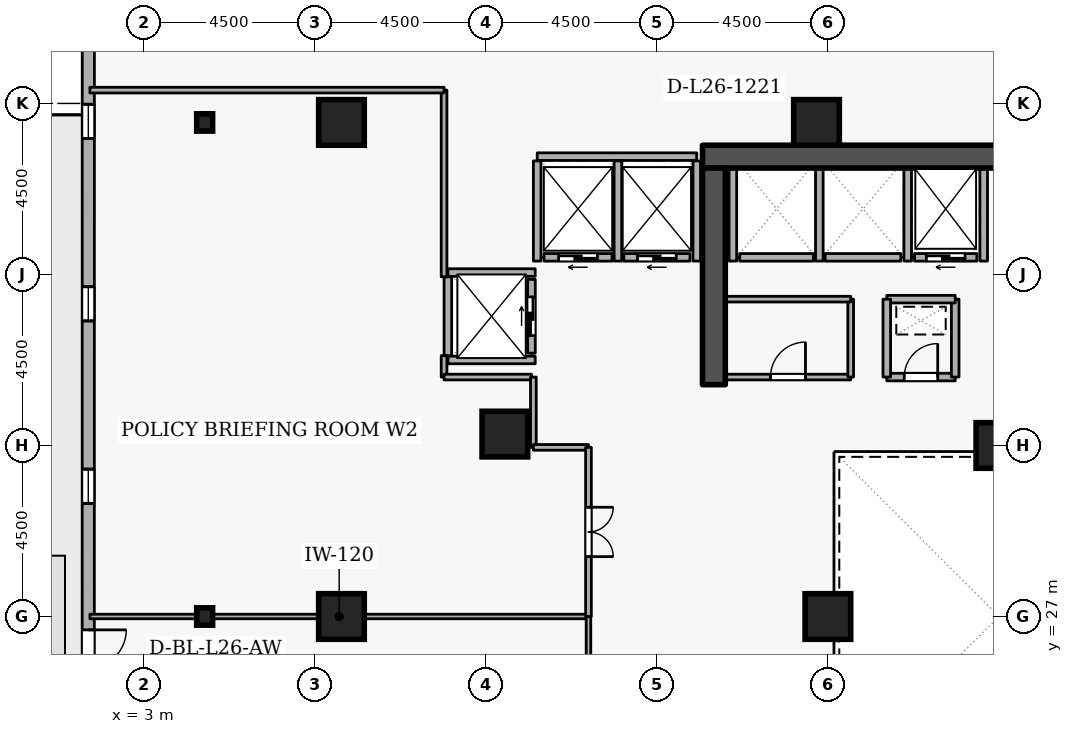
"""IFC4 building model, lengths in metres.
Left out: names, types, materials, properties, quantities, classifications, styles, units other than length and angle.
Written with IfcOpenShell. Run it as: python <this file> out.ifc"""

import sys

from ifc_helpers import new_model, si_unit, direction, frame, frame_2d, origin, origin_2d, place, context, subcontext, project, spatial, rectangle, i_section, extrude, element, fill, save


model = new_model("IFC4")
c1 = context("Model", 3, precision=1e-05, world=origin(), true_north=direction((0.0, 1.0)))
c2 = subcontext(c1, "Body", "Model", "MODEL_VIEW")
j1 = project(units=[si_unit("LENGTHUNIT", "METRE"), si_unit("PLANEANGLEUNIT", "RADIAN")], contexts=[c1])
p1 = place(None, origin())
s1 = spatial("IfcSite", under=j1, at=p1, CompositionType="ELEMENT")
p2 = place(p1, origin())
s2 = spatial("IfcBuilding", under=s1, at=p2, CompositionType="ELEMENT")
p3 = place(p2, frame((0.0, 0.0, 101.7)))
s3 = spatial("IfcBuildingStorey", under=s2, at=p3, CompositionType="ELEMENT", Elevation=101.7)
p4 = place(p3, frame((17.7, 39.1, 0.0), z_axis=(0.0, 0.0, 1.0), x_axis=(1.0, 0.0, 0.0)))
e1 = element("IfcWall", 1, at=p4, inside=s3, PredefinedType="SHEAR", context=c2, shape_type="SweptSolid", body=[
    extrude(rectangle(XDim=15.6, YDim=0.6, at=frame_2d((7.8, 0.0))), origin(), (0.0, 0.0, 1.0), 3.6),
])
p5 = place(p3, frame((18.0, 33.1, 0.0), z_axis=(0.0, 0.0, 1.0), x_axis=(0.0, 1.0, 0.0)))
e2 = element("IfcWall", 2, at=p5, inside=s3, PredefinedType="SHEAR", context=c2, shape_type="SweptSolid", body=[
    extrude(rectangle(XDim=5.7, YDim=0.6, at=frame_2d((2.85, 0.0))), origin(), (0.0, 0.0, 1.0), 3.6),
])
for number, where, z_axis, x_axis in (
    (3, (8.2, 27.0, 0.0), (0.0, 0.0, 1.0), (1.0, 0.0, 0.0)),
    (4, (8.2, 40.0, 0.0), (0.0, 0.0, 1.0), (1.0, 0.0, 0.0)),
    (5, (12.5, 31.8, 0.0), (0.0, 0.0, 1.0), (1.0, 0.0, 0.0)),
    (6, (20.7, 40.0, 0.0), (0.0, 0.0, 1.0), (1.0, 0.0, 0.0)),
    (7, (25.5, 31.5, 0.0), (0.0, 0.0, 1.0), (1.0, 0.0, 0.0)),
    (8, (21.0, 27.0, 0.0), (0.0, 0.0, 1.0), (1.0, 0.0, 0.0)),
):
    element("IfcColumn", number, at=place(p3, frame(where, z_axis=z_axis, x_axis=x_axis)), inside=s3, PredefinedType="COLUMN", context=c2, shape_type="SweptSolid", body=[
        extrude(rectangle(XDim=1.2, YDim=1.2, at=origin_2d()), origin(), (0.0, 0.0, 1.0), 3.6),
    ])
for number, where, z_axis, x_axis in (
    (9, (4.6, 27.0, 0.0), (0.0, 0.0, 1.0), (1.0, 0.0, 0.0)),
    (10, (4.6, 40.0, 0.0), (0.0, 0.0, 1.0), (1.0, 0.0, 0.0)),
):
    element("IfcColumn", number, at=place(p3, frame(where, z_axis=z_axis, x_axis=x_axis)), inside=s3, PredefinedType="COLUMN", context=c2, shape_type="SweptSolid", body=[
        extrude(i_section(OverallWidth=0.418, OverallDepth=0.456, WebThickness=0.042, FlangeThickness=0.067, FilletRadius=0.015, at=origin_2d()), origin(), (0.0, 0.0, 1.0), 3.6),
    ])
p6 = place(p3, frame((1.54, 47.077, 0.0), z_axis=(0.0, 0.0, 1.0), x_axis=(-0.00011704845, -0.99999999315, 0.0)))
e11 = element("IfcWall", 11, at=p6, inside=s3, PredefinedType="STANDARD", context=c2, shape_type="SweptSolid", body=[
    extrude(rectangle(XDim=35.459, YDim=0.32, at=frame_2d((17.729, 0.0))), origin(), (0.0, 0.0, 1.0), 2.7),
])
p7 = place(p6, frame((20.429, 0.0, 0.0)))
e12 = element("IfcOpeningElement", 12, at=p7, cuts=e11, PredefinedType="OPENING", context=c2, shape_type="SweptSolid", body=[
    extrude(rectangle(XDim=1.0, YDim=2.08, at=frame_2d((0.5, 1.04))), frame((0.0, 0.17, 0.0), z_axis=(0.0, -1.0, 0.0), x_axis=(1.0, 0.0, 0.0)), (0.0, 0.0, 1.0), 0.34),
])
p8 = place(p6, frame((1.8, 0.0, 0.72)))
e13 = element("IfcOpeningElement", 13, at=p8, cuts=e11, PredefinedType="OPENING", context=c2, shape_type="SweptSolid", body=[
    extrude(rectangle(XDim=0.9, YDim=1.75, at=frame_2d((0.45, 0.875))), frame((0.0, 0.17, 0.0), z_axis=(0.0, -1.0, 0.0), x_axis=(1.0, 0.0, 0.0)), (0.0, 0.0, 1.0), 0.34),
])
p9 = place(p6, frame((6.6, 0.0, 0.72)))
e14 = element("IfcOpeningElement", 14, at=p9, cuts=e11, PredefinedType="OPENING", context=c2, shape_type="SweptSolid", body=[
    extrude(rectangle(XDim=0.9, YDim=1.75, at=frame_2d((0.45, 0.875))), frame((0.0, 0.17, 0.0), z_axis=(0.0, -1.0, 0.0), x_axis=(1.0, 0.0, 0.0)), (0.0, 0.0, 1.0), 0.34),
])
p10 = place(p6, frame((11.4, 0.0, 0.72)))
e15 = element("IfcOpeningElement", 15, at=p10, cuts=e11, PredefinedType="OPENING", context=c2, shape_type="SweptSolid", body=[
    extrude(rectangle(XDim=0.9, YDim=1.75, at=frame_2d((0.45, 0.875))), frame((0.0, 0.17, 0.0), z_axis=(0.0, -1.0, 0.0), x_axis=(1.0, 0.0, 0.0)), (0.0, 0.0, 1.0), 0.34),
])
p11 = place(p6, frame((16.2, 0.0, 0.72)))
e16 = element("IfcOpeningElement", 16, at=p11, cuts=e11, PredefinedType="OPENING", context=c2, shape_type="SweptSolid", body=[
    extrude(rectangle(XDim=0.9, YDim=1.75, at=frame_2d((0.45, 0.875))), frame((0.0, 0.17, 0.0), z_axis=(0.0, -1.0, 0.0), x_axis=(1.0, 0.0, 0.0)), (0.0, 0.0, 1.0), 0.34),
])
p12 = place(p6, frame((25.8, 0.0, 0.72)))
e17 = element("IfcOpeningElement", 17, at=p12, cuts=e11, PredefinedType="OPENING", context=c2, shape_type="SweptSolid", body=[
    extrude(rectangle(XDim=0.9, YDim=1.75, at=frame_2d((0.45, 0.875))), frame((0.0, 0.17, 0.0), z_axis=(0.0, -1.0, 0.0), x_axis=(1.0, 0.0, 0.0)), (0.0, 0.0, 1.0), 0.34),
])
p13 = place(p6, frame((30.6, 0.0, 0.72)))
e18 = element("IfcOpeningElement", 18, at=p13, cuts=e11, PredefinedType="OPENING", context=c2, shape_type="SweptSolid", body=[
    extrude(rectangle(XDim=0.9, YDim=1.75, at=frame_2d((0.45, 0.875))), frame((0.0, 0.17, 0.0), z_axis=(0.0, -1.0, 0.0), x_axis=(1.0, 0.0, 0.0)), (0.0, 0.0, 1.0), 0.34),
])
p14 = place(p3, frame((24.92, 36.45, 0.0), z_axis=(0.0, 0.0, 1.0), x_axis=(-1.0, 0.0, 0.0)))
e19 = element("IfcWall", 19, at=p14, inside=s3, PredefinedType="STANDARD", context=c2, shape_type="SweptSolid", body=[
    extrude(rectangle(XDim=1.64, YDim=0.2, at=frame_2d((0.82, 0.0))), origin(), (0.0, 0.0, 1.0), 3.34),
])
p15 = place(p14, frame((0.31, 0.0, 0.0)))
e20 = element("IfcOpeningElement", 20, at=p15, cuts=e19, PredefinedType="OPENING", context=c2, shape_type="SweptSolid", body=[
    extrude(rectangle(XDim=1.02, YDim=2.06, at=frame_2d((0.51, 1.03))), frame((0.0, 0.11, 0.0), z_axis=(0.0, -1.0, 0.0), x_axis=(1.0, 0.0, 0.0)), (0.0, 0.0, 1.0), 0.22),
])
p16 = place(p3, frame((22.92, 36.45, 0.0), z_axis=(0.0, 0.0, 1.0), x_axis=(-1.0, 0.0, 0.0)))
e21 = element("IfcWall", 21, at=p16, inside=s3, PredefinedType="STANDARD", context=c2, shape_type="SweptSolid", body=[
    extrude(rectangle(XDim=1.99, YDim=0.2, at=frame_2d((0.995, 0.0))), origin(), (0.0, 0.0, 1.0), 3.34),
])
p17 = place(p3, frame((20.62, 36.45, 0.0), z_axis=(0.0, 0.0, 1.0), x_axis=(-1.0, 0.0, 0.0)))
e22 = element("IfcWall", 22, at=p17, inside=s3, PredefinedType="STANDARD", context=c2, shape_type="SweptSolid", body=[
    extrude(rectangle(XDim=1.94, YDim=0.2, at=frame_2d((0.97, 0.0))), origin(), (0.0, 0.0, 1.0), 3.34),
])
p18 = place(p3, frame((17.37, 36.45, 0.0), z_axis=(0.0, 0.0, 1.0), x_axis=(-1.0, 0.0, 0.0)))
e23 = element("IfcWall", 23, at=p18, inside=s3, PredefinedType="STANDARD", context=c2, shape_type="SweptSolid", body=[
    extrude(rectangle(XDim=1.74, YDim=0.2, at=frame_2d((0.87, 0.0))), origin(), (0.0, 0.0, 1.0), 3.34),
])
p19 = place(p18, frame((0.36, 0.0, 0.0)))
e24 = element("IfcOpeningElement", 24, at=p19, cuts=e23, PredefinedType="OPENING", context=c2, shape_type="SweptSolid", body=[
    extrude(rectangle(XDim=1.02, YDim=2.06, at=frame_2d((0.51, 1.03))), frame((0.0, 0.11, 0.0), z_axis=(0.0, -1.0, 0.0), x_axis=(1.0, 0.0, 0.0)), (0.0, 0.0, 1.0), 0.22),
])
p20 = place(p3, frame((15.32, 36.45, 0.0), z_axis=(0.0, 0.0, 1.0), x_axis=(-1.0, 0.0, 0.0)))
e25 = element("IfcWall", 25, at=p20, inside=s3, PredefinedType="STANDARD", context=c2, shape_type="SweptSolid", body=[
    extrude(rectangle(XDim=1.79, YDim=0.2, at=frame_2d((0.895, 0.0))), origin(), (0.0, 0.0, 1.0), 3.34),
])
p21 = place(p20, frame((0.385, 0.0, 0.0)))
e26 = element("IfcOpeningElement", 26, at=p21, cuts=e25, PredefinedType="OPENING", context=c2, shape_type="SweptSolid", body=[
    extrude(rectangle(XDim=1.02, YDim=2.06, at=frame_2d((0.51, 1.03))), frame((0.0, 0.11, 0.0), z_axis=(0.0, -1.0, 0.0), x_axis=(1.0, 0.0, 0.0)), (0.0, 0.0, 1.0), 0.22),
])
p22 = place(p3, frame((13.2, 33.93, 0.0), z_axis=(0.0, 0.0, 1.0), x_axis=(0.0, 1.0, 0.0)))
e27 = element("IfcWall", 27, at=p22, inside=s3, PredefinedType="STANDARD", context=c2, shape_type="SweptSolid", body=[
    extrude(rectangle(XDim=1.94, YDim=0.2, at=frame_2d((0.97, 0.0))), origin(), (0.0, 0.0, 1.0), 3.34),
])
p23 = place(p22, frame((0.46, 0.0, 0.0)))
e28 = element("IfcOpeningElement", 28, at=p23, cuts=e27, PredefinedType="OPENING", context=c2, shape_type="SweptSolid", body=[
    extrude(rectangle(XDim=1.02, YDim=2.06, at=frame_2d((0.51, 1.03))), frame((0.0, 0.11, 0.0), z_axis=(0.0, -1.0, 0.0), x_axis=(1.0, 0.0, 0.0)), (0.0, 0.0, 1.0), 0.22),
])
for number, where, z_axis, x_axis in (
    (29, (25.1, 36.352, 0.0), (0.0, 0.0, 1.0), (0.0, 1.0, 0.0)),
    (30, (23.1, 36.352, 0.0), (0.0, 0.0, 1.0), (0.0, 1.0, 0.0)),
    (31, (20.775, 36.352, 0.0), (0.0, 0.0, 1.0), (0.0, 1.0, 0.0)),
    (32, (18.5, 36.352, 0.0), (0.0, 0.0, 1.0), (0.0, 1.0, 0.0)),
):
    element("IfcWall", number, at=place(p3, frame(where, z_axis=z_axis, x_axis=x_axis)), inside=s3, PredefinedType="STANDARD", context=c2, shape_type="SweptSolid", body=[
        extrude(rectangle(XDim=2.436, YDim=0.2, at=frame_2d((1.218, 0.0))), origin(), (0.0, 0.0, 1.0), 3.34),
    ])
p24 = place(p3, frame((13.352, 39.1, 0.0), z_axis=(0.0, 0.0, 1.0), x_axis=(1.0, 0.0, 0.0)))
e33 = element("IfcWall", 33, at=p24, inside=s3, PredefinedType="STANDARD", context=c2, shape_type="SweptSolid", body=[
    extrude(rectangle(XDim=4.196, YDim=0.2, at=frame_2d((2.098, 0.0))), origin(), (0.0, 0.0, 1.0), 3.34),
])
p25 = place(p3, frame((17.55, 36.352, 0.0), z_axis=(0.0, 0.0, 1.0), x_axis=(0.0, 1.0, 0.0)))
e34 = element("IfcWall", 34, at=p25, inside=s3, PredefinedType="STANDARD", context=c2, shape_type="SweptSolid", body=[
    extrude(rectangle(XDim=2.636, YDim=0.2, at=frame_2d((1.318, 0.0))), origin(), (0.0, 0.0, 1.0), 2.545),
])
for number, where, z_axis, x_axis in (
    (35, (15.475, 36.352, 0.0), (0.0, 0.0, 1.0), (0.0, 1.0, 0.0)),
    (36, (13.35, 36.352, 0.0), (0.0, 0.0, 1.0), (0.0, 1.0, 0.0)),
):
    element("IfcWall", number, at=place(p3, frame(where, z_axis=z_axis, x_axis=x_axis)), inside=s3, PredefinedType="STANDARD", context=c2, shape_type="SweptSolid", body=[
        extrude(rectangle(XDim=2.636, YDim=0.2, at=frame_2d((1.318, 0.0))), origin(), (0.0, 0.0, 1.0), 3.34),
    ])
for number, where, z_axis, x_axis in (
    (37, (11.002, 36.05, 0.0), (0.0, 0.0, 1.0), (1.0, 0.0, 0.0)),
    (38, (11.002, 33.75, 0.0), (0.0, 0.0, 1.0), (1.0, 0.0, 0.0)),
):
    element("IfcWall", number, at=place(p3, frame(where, z_axis=z_axis, x_axis=x_axis)), inside=s3, PredefinedType="STANDARD", context=c2, shape_type="SweptSolid", body=[
        extrude(rectangle(XDim=2.296, YDim=0.2, at=frame_2d((1.148, 0.0))), origin(), (0.0, 0.0, 1.0), 3.34),
    ])
p26 = place(p3, frame((11.0, 33.862, 0.0), z_axis=(0.0, 0.0, 1.0), x_axis=(0.0, 1.0, 0.0)))
e39 = element("IfcWall", 39, at=p26, inside=s3, PredefinedType="STANDARD", context=c2, shape_type="SweptSolid", body=[
    extrude(rectangle(XDim=2.076, YDim=0.2, at=frame_2d((1.038, 0.0))), origin(), (0.0, 0.0, 1.0), 3.34),
])
p27 = place(p3, frame((22.55, 33.3, 0.0), z_axis=(0.0, 0.0, 1.0), x_axis=(1.0, 0.0, 0.0)))
e40 = element("IfcWall", 40, at=p27, inside=s3, PredefinedType="STANDARD", context=c2, shape_type="SweptSolid", body=[
    extrude(rectangle(XDim=1.8, YDim=0.2, at=frame_2d((0.9, 0.0))), origin(), (0.0, 0.0, 1.0), 3.34),
])
p28 = place(p27, frame((0.46, 0.0, 0.0)))
e41 = element("IfcOpeningElement", 41, at=p28, cuts=e40, PredefinedType="OPENING", context=c2, shape_type="SweptSolid", body=[
    extrude(rectangle(XDim=0.88, YDim=2.04, at=frame_2d((0.44, 1.02))), frame((0.0, 0.11, 0.0), z_axis=(0.0, -1.0, 0.0), x_axis=(1.0, 0.0, 0.0)), (0.0, 0.0, 1.0), 0.22),
])
p29 = place(p3, frame((24.35, 33.3, 0.0), z_axis=(0.0, 0.0, 1.0), x_axis=(0.0, 1.0, 0.0)))
e42 = element("IfcWall", 42, at=p29, inside=s3, PredefinedType="STANDARD", context=c2, shape_type="SweptSolid", body=[
    extrude(rectangle(XDim=2.05, YDim=0.2, at=frame_2d((1.025, 0.0))), origin(), (0.0, 0.0, 1.0), 3.34),
])
p30 = place(p3, frame((24.35, 35.35, 0.0), z_axis=(0.0, 0.0, 1.0), x_axis=(-1.0, 0.0, 0.0)))
e43 = element("IfcWall", 43, at=p30, inside=s3, PredefinedType="STANDARD", context=c2, shape_type="SweptSolid", body=[
    extrude(rectangle(XDim=1.8, YDim=0.2, at=frame_2d((0.9, 0.0))), origin(), (0.0, 0.0, 1.0), 3.34),
])
p31 = place(p3, frame((22.55, 35.35, 0.0), z_axis=(0.0, 0.0, 1.0), x_axis=(0.0, -1.0, 0.0)))
e44 = element("IfcWall", 44, at=p31, inside=s3, PredefinedType="STANDARD", context=c2, shape_type="SweptSolid", body=[
    extrude(rectangle(XDim=2.05, YDim=0.2, at=frame_2d((1.025, 0.0))), origin(), (0.0, 0.0, 1.0), 3.34),
])
p32 = place(p3, frame((18.3, 33.3, 0.0), z_axis=(0.0, 0.0, 1.0), x_axis=(1.0, 0.0, 0.0)))
e45 = element("IfcWall", 45, at=p32, inside=s3, PredefinedType="PARTITIONING", context=c2, shape_type="SweptSolid", body=[
    extrude(rectangle(XDim=3.3, YDim=0.15, at=frame_2d((1.65, 0.0))), origin(), (0.0, 0.0, 1.0), 3.34),
])
p33 = place(p32, frame((1.19, 0.0, 0.0)))
e46 = element("IfcOpeningElement", 46, at=p33, cuts=e45, PredefinedType="OPENING", context=c2, shape_type="SweptSolid", body=[
    extrude(rectangle(XDim=0.92, YDim=2.08, at=frame_2d((0.46, 1.04))), frame((0.0, 0.085, 0.0), z_axis=(0.0, -1.0, 0.0), x_axis=(1.0, 0.0, 0.0)), (0.0, 0.0, 1.0), 0.17),
])
p34 = place(p3, frame((21.6, 33.3, 0.0), z_axis=(0.0, 0.0, 1.0), x_axis=(0.0, 1.0, 0.0)))
e47 = element("IfcWall", 47, at=p34, inside=s3, PredefinedType="PARTITIONING", context=c2, shape_type="SweptSolid", body=[
    extrude(rectangle(XDim=2.05, YDim=0.15, at=frame_2d((1.025, 0.0))), origin(), (0.0, 0.0, 1.0), 3.34),
])
p35 = place(p3, frame((21.6, 35.35, 0.0), z_axis=(0.0, 0.0, 1.0), x_axis=(-1.0, 0.0, 0.0)))
e48 = element("IfcWall", 48, at=p35, inside=s3, PredefinedType="PARTITIONING", context=c2, shape_type="SweptSolid", body=[
    extrude(rectangle(XDim=3.3, YDim=0.15, at=frame_2d((1.65, 0.0))), origin(), (0.0, 0.0, 1.0), 3.34),
])
p36 = place(p3, frame((1.58, 27.0, 0.0), z_axis=(0.0, 0.0, 1.0), x_axis=(1.0, 0.0, 0.0)))
e49 = element("IfcWall", 49, at=p36, inside=s3, PredefinedType="PARTITIONING", context=c2, shape_type="SweptSolid", body=[
    extrude(rectangle(XDim=13.12, YDim=0.12, at=frame_2d((6.56, 0.0))), origin(), (0.0, 0.0, 1.0), 2.878),
])
p37 = place(p3, frame((14.7, 27.0, 0.0), z_axis=(0.0, 0.0, 1.0), x_axis=(0.0, -1.0, 0.0)))
e50 = element("IfcWall", 50, at=p37, inside=s3, PredefinedType="PARTITIONING", context=c2, shape_type="SweptSolid", body=[
    extrude(rectangle(XDim=4.45, YDim=0.12, at=frame_2d((2.225, 0.0))), origin(), (0.0, 0.0, 1.0), 3.34),
])
p38 = place(p37, frame((1.7, 0.0, 0.0)))
e51 = element("IfcOpeningElement", 51, at=p38, cuts=e50, PredefinedType="OPENING", context=c2, shape_type="SweptSolid", body=[
    extrude(rectangle(XDim=1.05, YDim=2.1, at=frame_2d((0.525, 1.05))), frame((0.0, 0.07, 0.0), z_axis=(0.0, -1.0, 0.0), x_axis=(1.0, 0.0, 0.0)), (0.0, 0.0, 1.0), 0.14),
])
p39 = place(p3, frame((10.9, 40.85, 0.0), z_axis=(0.0, 0.0, 1.0), x_axis=(0.0, -1.0, 0.0)))
e52 = element("IfcWall", 52, at=p39, inside=s3, PredefinedType="PARTITIONING", context=c2, shape_type="SweptSolid", body=[
    extrude(rectangle(XDim=4.912, YDim=0.15, at=frame_2d((2.456, 0.0))), origin(), (0.0, 0.0, 1.0), 3.34),
])
p40 = place(p3, frame((10.9, 33.862, 0.0), z_axis=(0.0, 0.0, 1.0), x_axis=(0.0, -1.0, 0.0)))
e53 = element("IfcWall", 53, at=p40, inside=s3, PredefinedType="PARTITIONING", context=c2, shape_type="SweptSolid", body=[
    extrude(rectangle(XDim=0.562, YDim=0.15, at=frame_2d((0.281, 0.0))), origin(), (0.0, 0.0, 1.0), 3.34),
])
p41 = place(p3, frame((10.9, 33.3, 0.0), z_axis=(0.0, 0.0, 1.0), x_axis=(1.0, 0.0, 0.0)))
e54 = element("IfcWall", 54, at=p41, inside=s3, PredefinedType="PARTITIONING", context=c2, shape_type="SweptSolid", body=[
    extrude(rectangle(XDim=2.3, YDim=0.15, at=frame_2d((1.15, 0.0))), origin(), (0.0, 0.0, 1.0), 3.34),
])
p42 = place(p3, frame((13.25, 33.3, 0.0), z_axis=(0.0, 0.0, 1.0), x_axis=(0.0, -1.0, 0.0)))
e55 = element("IfcWall", 55, at=p42, inside=s3, PredefinedType="PARTITIONING", context=c2, shape_type="SweptSolid", body=[
    extrude(rectangle(XDim=1.85, YDim=0.15, at=frame_2d((0.925, 0.0))), origin(), (0.0, 0.0, 1.0), 3.34),
])
p43 = place(p3, frame((13.25, 31.45, 0.0), z_axis=(0.0, 0.0, 1.0), x_axis=(1.0, 0.0, 0.0)))
e56 = element("IfcWall", 56, at=p43, inside=s3, PredefinedType="PARTITIONING", context=c2, shape_type="SweptSolid", body=[
    extrude(rectangle(XDim=1.45, YDim=0.15, at=frame_2d((0.725, 0.0))), origin(), (0.0, 0.0, 1.0), 3.34),
])
p44 = place(p3, frame((14.7, 31.45, 0.0), z_axis=(0.0, 0.0, 1.0), x_axis=(0.0, -1.0, 0.0)))
e57 = element("IfcWall", 57, at=p44, inside=s3, PredefinedType="PARTITIONING", context=c2, shape_type="SweptSolid", body=[
    extrude(rectangle(XDim=4.45, YDim=0.15, at=frame_2d((2.225, 0.0))), origin(), (0.0, 0.0, 1.0), 3.34),
])
p45 = place(p44, frame((1.575, 0.0, 0.0)))
e58 = element("IfcOpeningElement", 58, at=p45, cuts=e57, PredefinedType="OPENING", context=c2, shape_type="SweptSolid", body=[
    extrude(rectangle(XDim=1.3, YDim=2.12, at=frame_2d((0.65, 1.06))), frame((0.0, 0.085, 0.0), z_axis=(0.0, -1.0, 0.0), x_axis=(1.0, 0.0, 0.0)), (0.0, 0.0, 1.0), 0.17),
])
p46 = place(p3, frame((1.58, 40.85, 0.0), z_axis=(0.0, 0.0, 1.0), x_axis=(1.0, 0.0, 0.0)))
e59 = element("IfcWall", 59, at=p46, inside=s3, PredefinedType="PARTITIONING", context=c2, shape_type="SweptSolid", body=[
    extrude(rectangle(XDim=9.32, YDim=0.15, at=frame_2d((4.66, 0.0))), origin(), (0.0, 0.0, 1.0), 3.34),
])
p47 = place(p7, origin())
e60 = element("IfcDoor", 60, at=p47, inside=s3, OperationType="SINGLE_SWING_LEFT", PredefinedType="DOOR", context=c2, shape_type="SweptSolid", body=[
    extrude(rectangle(XDim=1.0, YDim=2.08, at=frame_2d((0.5, 1.04))), frame((0.0, 0.025, 0.0), z_axis=(0.0, -1.0, 0.0), x_axis=(1.0, 0.0, 0.0)), (0.0, 0.0, 1.0), 0.05),
])
fill(e12, e60)
p48 = place(p9, origin())
e61 = element("IfcWindow", 61, at=p48, inside=s3, PartitioningType="SINGLE_PANEL", PredefinedType="WINDOW", context=c2, shape_type="SweptSolid", body=[
    extrude(rectangle(XDim=0.9, YDim=1.75, at=frame_2d((0.45, 0.875))), frame((0.0, 0.03, 0.0), z_axis=(0.0, -1.0, 0.0), x_axis=(1.0, 0.0, 0.0)), (0.0, 0.0, 1.0), 0.06),
])
fill(e14, e61)
p49 = place(p10, origin())
e62 = element("IfcWindow", 62, at=p49, inside=s3, PartitioningType="SINGLE_PANEL", PredefinedType="WINDOW", context=c2, shape_type="SweptSolid", body=[
    extrude(rectangle(XDim=0.9, YDim=1.75, at=frame_2d((0.45, 0.875))), frame((0.0, 0.03, 0.0), z_axis=(0.0, -1.0, 0.0), x_axis=(1.0, 0.0, 0.0)), (0.0, 0.0, 1.0), 0.06),
])
fill(e15, e62)
p50 = place(p11, origin())
e63 = element("IfcWindow", 63, at=p50, inside=s3, PartitioningType="SINGLE_PANEL", PredefinedType="WINDOW", context=c2, shape_type="SweptSolid", body=[
    extrude(rectangle(XDim=0.9, YDim=1.75, at=frame_2d((0.45, 0.875))), frame((0.0, 0.03, 0.0), z_axis=(0.0, -1.0, 0.0), x_axis=(1.0, 0.0, 0.0)), (0.0, 0.0, 1.0), 0.06),
])
fill(e16, e63)
p51 = place(p15, origin())
e64 = element("IfcDoor", 64, at=p51, inside=s3, OperationType="SLIDING_TO_LEFT", PredefinedType="DOOR", context=c2, shape_type="SweptSolid", body=[
    extrude(rectangle(XDim=1.02, YDim=2.06, at=frame_2d((0.51, 1.03))), frame((0.0, 0.025, 0.0), z_axis=(0.0, -1.0, 0.0), x_axis=(1.0, 0.0, 0.0)), (0.0, 0.0, 1.0), 0.05),
])
fill(e20, e64)
p52 = place(p19, origin())
e65 = element("IfcDoor", 65, at=p52, inside=s3, OperationType="SLIDING_TO_LEFT", PredefinedType="DOOR", context=c2, shape_type="SweptSolid", body=[
    extrude(rectangle(XDim=1.02, YDim=2.06, at=frame_2d((0.51, 1.03))), frame((0.0, 0.025, 0.0), z_axis=(0.0, -1.0, 0.0), x_axis=(1.0, 0.0, 0.0)), (0.0, 0.0, 1.0), 0.05),
])
fill(e24, e65)
p53 = place(p21, origin())
e66 = element("IfcDoor", 66, at=p53, inside=s3, OperationType="SLIDING_TO_LEFT", PredefinedType="DOOR", context=c2, shape_type="SweptSolid", body=[
    extrude(rectangle(XDim=1.02, YDim=2.06, at=frame_2d((0.51, 1.03))), frame((0.0, 0.025, 0.0), z_axis=(0.0, -1.0, 0.0), x_axis=(1.0, 0.0, 0.0)), (0.0, 0.0, 1.0), 0.05),
])
fill(e26, e66)
p54 = place(p23, origin())
e67 = element("IfcDoor", 67, at=p54, inside=s3, OperationType="SLIDING_TO_LEFT", PredefinedType="DOOR", context=c2, shape_type="SweptSolid", body=[
    extrude(rectangle(XDim=1.02, YDim=2.06, at=frame_2d((0.51, 1.03))), frame((0.0, 0.025, 0.0), z_axis=(0.0, -1.0, 0.0), x_axis=(1.0, 0.0, 0.0)), (0.0, 0.0, 1.0), 0.05),
])
fill(e28, e67)
p55 = place(p28, origin())
e68 = element("IfcDoor", 68, at=p55, inside=s3, OperationType="SINGLE_SWING_RIGHT", PredefinedType="DOOR", context=c2, shape_type="SweptSolid", body=[
    extrude(rectangle(XDim=0.88, YDim=2.04, at=frame_2d((0.44, 1.02))), frame((0.0, 0.025, 0.0), z_axis=(0.0, -1.0, 0.0), x_axis=(1.0, 0.0, 0.0)), (0.0, 0.0, 1.0), 0.05),
])
fill(e41, e68)
p56 = place(p33, origin())
e69 = element("IfcDoor", 69, at=p56, inside=s3, OperationType="SINGLE_SWING_RIGHT", PredefinedType="DOOR", context=c2, shape_type="SweptSolid", body=[
    extrude(rectangle(XDim=0.92, YDim=2.08, at=frame_2d((0.46, 1.04))), frame((0.0, 0.025, 0.0), z_axis=(0.0, -1.0, 0.0), x_axis=(1.0, 0.0, 0.0)), (0.0, 0.0, 1.0), 0.05),
])
fill(e46, e69)
p57 = place(p45, origin())
e70 = element("IfcDoor", 70, at=p57, inside=s3, OperationType="DOUBLE_DOOR_SINGLE_SWING", PredefinedType="DOOR", context=c2, shape_type="SweptSolid", body=[
    extrude(rectangle(XDim=1.3, YDim=2.12, at=frame_2d((0.65, 1.06))), frame((0.0, 0.025, 0.0), z_axis=(0.0, -1.0, 0.0), x_axis=(1.0, 0.0, 0.0)), (0.0, 0.0, 1.0), 0.05),
])
fill(e58, e70)
save(model, sys.argv[1])
